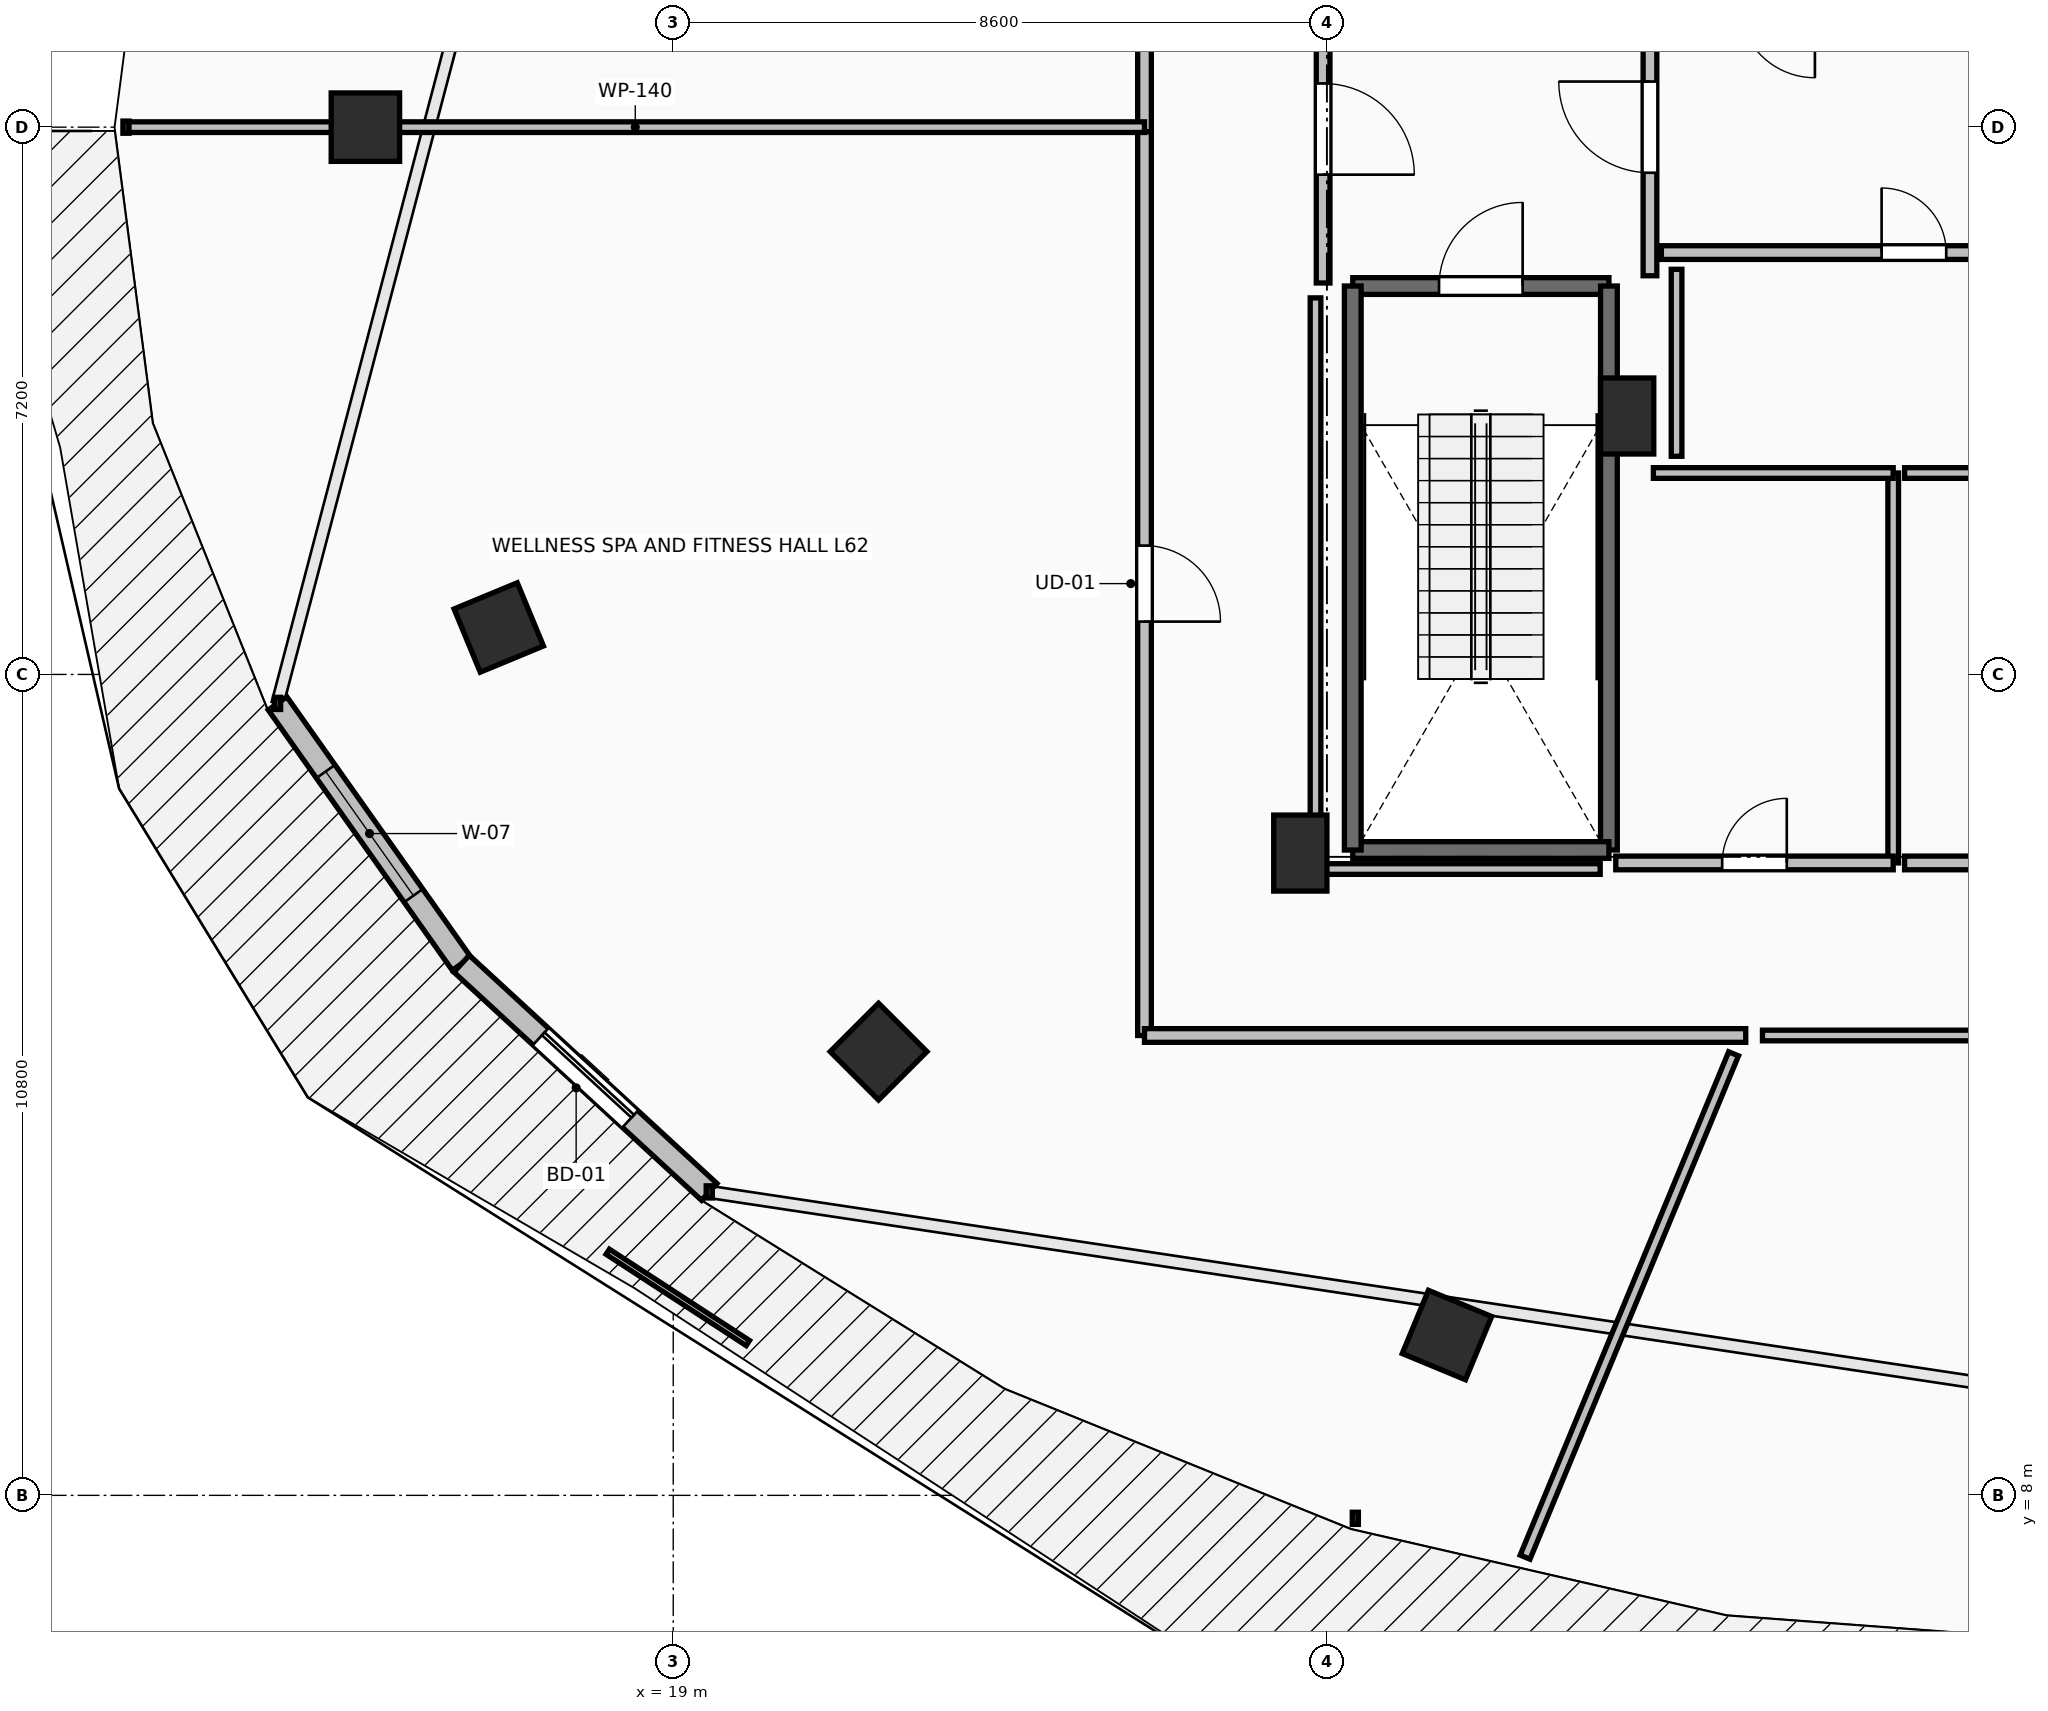
"""IFC4 building model, lengths in metres.
Left out: names, types, materials, properties, quantities, classifications, styles, units other than length and angle.
Written with IfcOpenShell. Run it as: python <this file> out.ifc"""

import sys

from ifc_helpers import new_model, si_unit, direction, frame, frame_2d, origin, origin_2d, place, context, subcontext, project, spatial, rectangle, extrude, element, fill, save


model = new_model("IFC4")
c1 = context("Model", 3, precision=1e-05, world=origin(), true_north=direction((0.0, 1.0)))
c2 = subcontext(c1, "Body", "Model", "MODEL_VIEW")
j1 = project(units=[si_unit("LENGTHUNIT", "METRE"), si_unit("PLANEANGLEUNIT", "RADIAN")], contexts=[c1])
p1 = place(None, origin())
s1 = spatial("IfcSite", under=j1, at=p1, CompositionType="ELEMENT")
p2 = place(p1, origin())
s2 = spatial("IfcBuilding", under=s1, at=p2, CompositionType="ELEMENT")
p3 = place(p2, frame((0.0, 0.0, 229.75)))
s3 = spatial("IfcBuildingStorey", under=s2, at=p3, CompositionType="ELEMENT", Elevation=229.75)
for number, where, z_axis, x_axis in (
    (1, (14.95, 26.0, 0.0), (0.0, 0.0, 1.0), (-1.0, 0.0, 0.0)),
    (2, (16.705, 19.418, 0.0), (0.0, 0.0, 1.0), (-0.924, -0.383, 0.0)),
    (3, (21.701, 13.838, 0.0), (0.0, 0.0, 1.0), (-0.707, -0.707, 0.0)),
    (4, (29.179, 10.109, 0.0), (0.0, 0.0, 1.0), (-0.383, -0.924, 0.0)),
):
    element("IfcColumn", number, at=place(p3, frame(where, z_axis=z_axis, x_axis=x_axis)), inside=s3, PredefinedType="COLUMN", context=c2, shape_type="SweptSolid", body=[
        extrude(rectangle(XDim=0.9, YDim=0.9, at=origin_2d()), origin(), (0.0, 0.0, 1.0), 4.5),
    ])
for number, where, z_axis, x_axis in (
    (5, (27.25, 16.45, 0.0), (0.0, 0.0, 1.0), (1.0, 0.0, 0.0)),
    (6, (31.55, 22.2, 0.0), (0.0, 0.0, 1.0), (1.0, 0.0, 0.0)),
):
    element("IfcColumn", number, at=place(p3, frame(where, z_axis=z_axis, x_axis=x_axis)), inside=s3, PredefinedType="PILASTER", context=c2, shape_type="SweptSolid", body=[
        extrude(rectangle(XDim=0.7, YDim=1.0, at=origin_2d()), origin(), (0.0, 0.0, 1.0), 4.5),
    ])
p4 = place(p3, frame((13.794, 18.419, 0.0), z_axis=(0.0, 0.0, 1.0), x_axis=(0.577261247247, -0.816559521668, 0.0)))
e7 = element("IfcWall", 7, at=p4, inside=s3, PredefinedType="STANDARD", context=c2, shape_type="SweptSolid", body=[
    extrude(rectangle(XDim=4.194, YDim=0.3, at=frame_2d((2.097, 0.0))), origin(), (0.0, 0.0, 1.0), 4.24),
])
p5 = place(p4, frame((1.097, 0.0, 0.85)))
e8 = element("IfcOpeningElement", 8, at=p5, cuts=e7, PredefinedType="OPENING", context=c2, shape_type="SweptSolid", body=[
    extrude(rectangle(XDim=2.0, YDim=2.45, at=frame_2d((1.0, 1.225))), frame((0.0, 0.165, 0.0), z_axis=(0.0, -1.0, 0.0), x_axis=(1.0, 0.0, 0.0)), (0.0, 0.0, 1.0), 0.33),
])
p6 = place(p3, frame((16.216, 14.994, 0.0), z_axis=(0.0, 0.0, 1.0), x_axis=(0.735445373611, -0.677584018727, 0.0)))
e9 = element("IfcWall", 9, at=p6, inside=s3, PredefinedType="STANDARD", context=c2, shape_type="SweptSolid", body=[
    extrude(rectangle(XDim=4.43, YDim=0.3, at=frame_2d((2.215, 0.0))), origin(), (0.0, 0.0, 1.0), 4.24),
])
p7 = place(p6, frame((1.415, 0.0, 0.0)))
e10 = element("IfcOpeningElement", 10, at=p7, cuts=e9, PredefinedType="OPENING", context=c2, shape_type="SweptSolid", body=[
    extrude(rectangle(XDim=1.6, YDim=2.3, at=frame_2d((0.8, 1.15))), frame((0.0, 0.165, 0.0), z_axis=(0.0, -1.0, 0.0), x_axis=(1.0, 0.0, 0.0)), (0.0, 0.0, 1.0), 0.33),
])
p8 = place(p3, frame((27.94, 23.91, 0.0), z_axis=(0.0, 0.0, 1.0), x_axis=(1.0, 0.0, 0.0)))
e11 = element("IfcWall", 11, at=p8, inside=s3, PredefinedType="SOLIDWALL", context=c2, shape_type="SweptSolid", body=[
    extrude(rectangle(XDim=3.37, YDim=0.22, at=frame_2d((1.685, 0.0))), origin(), (0.0, 0.0, 1.0), 4.24),
])
p9 = place(p8, frame((1.135, 0.0, 0.0)))
e12 = element("IfcOpeningElement", 12, at=p9, cuts=e11, PredefinedType="OPENING", context=c2, shape_type="SweptSolid", body=[
    extrude(rectangle(XDim=1.1, YDim=2.15, at=frame_2d((0.55, 1.075))), frame((0.0, 0.125, 0.0), z_axis=(0.0, -1.0, 0.0), x_axis=(1.0, 0.0, 0.0)), (0.0, 0.0, 1.0), 0.25),
])
p10 = place(p3, frame((31.31, 23.91, 0.0), z_axis=(0.0, 0.0, 1.0), x_axis=(0.0, -1.0, 0.0)))
e13 = element("IfcWall", 13, at=p10, inside=s3, PredefinedType="SOLIDWALL", context=c2, shape_type="SweptSolid", body=[
    extrude(rectangle(XDim=7.42, YDim=0.22, at=frame_2d((3.71, 0.0))), origin(), (0.0, 0.0, 1.0), 4.24),
])
p11 = place(p3, frame((31.31, 16.49, 0.0), z_axis=(0.0, 0.0, 1.0), x_axis=(-1.0, 0.0, 0.0)))
e14 = element("IfcWall", 14, at=p11, inside=s3, PredefinedType="SOLIDWALL", context=c2, shape_type="SweptSolid", body=[
    extrude(rectangle(XDim=3.37, YDim=0.22, at=frame_2d((1.685, 0.0))), origin(), (0.0, 0.0, 1.0), 4.24),
])
p12 = place(p3, frame((27.94, 16.49, 0.0), z_axis=(0.0, 0.0, 1.0), x_axis=(0.0, 1.0, 0.0)))
e15 = element("IfcWall", 15, at=p12, inside=s3, PredefinedType="SOLIDWALL", context=c2, shape_type="SweptSolid", body=[
    extrude(rectangle(XDim=7.42, YDim=0.22, at=frame_2d((3.71, 0.0))), origin(), (0.0, 0.0, 1.0), 4.24),
])
p13 = place(p3, frame((31.85, 24.045, 0.0), z_axis=(0.0, 0.0, 1.0), x_axis=(0.0, 1.0, 0.0)))
e16 = element("IfcWall", 16, at=p13, inside=s3, PredefinedType="PARTITIONING", context=c2, shape_type="SweptSolid", body=[
    extrude(rectangle(XDim=3.91, YDim=0.18, at=frame_2d((1.955, 0.0))), origin(), (0.0, 0.0, 1.0), 4.24),
])
p14 = place(p13, frame((1.355, 0.0, 0.0)))
e17 = element("IfcOpeningElement", 17, at=p14, cuts=e16, PredefinedType="OPENING", context=c2, shape_type="SweptSolid", body=[
    extrude(rectangle(XDim=1.2, YDim=2.15, at=frame_2d((0.6, 1.075))), frame((0.0, 0.105, 0.0), z_axis=(0.0, -1.0, 0.0), x_axis=(1.0, 0.0, 0.0)), (0.0, 0.0, 1.0), 0.21),
])
p15 = place(p3, frame((27.55, 28.0, 0.0), z_axis=(0.0, 0.0, 1.0), x_axis=(0.0, -1.0, 0.0)))
e18 = element("IfcWall", 18, at=p15, inside=s3, PredefinedType="PARTITIONING", context=c2, shape_type="SweptSolid", body=[
    extrude(rectangle(XDim=4.05, YDim=0.18, at=frame_2d((2.025, 0.0))), origin(), (0.0, 0.0, 1.0), 4.24),
])
p16 = place(p15, frame((1.425, 0.0, 0.0)))
e19 = element("IfcOpeningElement", 19, at=p16, cuts=e18, PredefinedType="OPENING", context=c2, shape_type="SweptSolid", body=[
    extrude(rectangle(XDim=1.2, YDim=2.15, at=frame_2d((0.6, 1.075))), frame((0.0, 0.105, 0.0), z_axis=(0.0, -1.0, 0.0), x_axis=(1.0, 0.0, 0.0)), (0.0, 0.0, 1.0), 0.21),
])
p17 = place(p3, frame((32.0, 24.35, 0.0), z_axis=(0.0, 0.0, 1.0), x_axis=(1.0, 0.0, 0.0)))
e20 = element("IfcWall", 20, at=p17, inside=s3, PredefinedType="PARTITIONING", context=c2, shape_type="SweptSolid", body=[
    extrude(rectangle(XDim=6.645, YDim=0.18, at=frame_2d((3.323, 0.0))), origin(), (0.0, 0.0, 1.0), 4.24),
])
p18 = place(p17, frame((2.897, 0.0, 0.0)))
e21 = element("IfcOpeningElement", 21, at=p18, cuts=e20, PredefinedType="OPENING", context=c2, shape_type="SweptSolid", body=[
    extrude(rectangle(XDim=0.85, YDim=2.1, at=frame_2d((0.425, 1.05))), frame((0.0, 0.105, 0.0), z_axis=(0.0, -1.0, 0.0), x_axis=(1.0, 0.0, 0.0)), (0.0, 0.0, 1.0), 0.21),
])
p19 = place(p3, frame((35.05, 16.32, 0.0), z_axis=(0.0, 0.0, 1.0), x_axis=(0.0, 1.0, 0.0)))
e22 = element("IfcWall", 22, at=p19, inside=s3, PredefinedType="PARTITIONING", context=c2, shape_type="SweptSolid", body=[
    extrude(rectangle(XDim=5.13, YDim=0.14, at=frame_2d((2.565, 0.0))), origin(), (0.0, 0.0, 1.0), 4.24),
])
p20 = place(p3, frame((35.05, 21.45, 0.0), z_axis=(0.0, 0.0, 1.0), x_axis=(-1.0, 0.0, 0.0)))
e23 = element("IfcWall", 23, at=p20, inside=s3, PredefinedType="PARTITIONING", context=c2, shape_type="SweptSolid", body=[
    extrude(rectangle(XDim=3.155, YDim=0.14, at=frame_2d((1.578, 0.0))), origin(), (0.0, 0.0, 1.0), 4.24),
])
p21 = place(p3, frame((31.4, 16.32, 0.0), z_axis=(0.0, 0.0, 1.0), x_axis=(1.0, 0.0, 0.0)))
e24 = element("IfcWall", 24, at=p21, inside=s3, PredefinedType="PARTITIONING", context=c2, shape_type="SweptSolid", body=[
    extrude(rectangle(XDim=3.65, YDim=0.18, at=frame_2d((1.825, 0.0))), origin(), (0.0, 0.0, 1.0), 4.24),
])
p22 = place(p21, frame((1.4, 0.0, 0.0)))
e25 = element("IfcOpeningElement", 25, at=p22, cuts=e24, PredefinedType="OPENING", context=c2, shape_type="SweptSolid", body=[
    extrude(rectangle(XDim=0.85, YDim=2.1, at=frame_2d((0.425, 1.05))), frame((0.0, 0.105, 0.0), z_axis=(0.0, -1.0, 0.0), x_axis=(1.0, 0.0, 0.0)), (0.0, 0.0, 1.0), 0.21),
])
p23 = place(p3, frame((38.8, 21.45, 0.0), z_axis=(0.0, 0.0, 1.0), x_axis=(-1.0, 0.0, 0.0)))
e26 = element("IfcWall", 26, at=p23, inside=s3, PredefinedType="PARTITIONING", context=c2, shape_type="SweptSolid", body=[
    extrude(rectangle(XDim=3.6, YDim=0.14, at=frame_2d((1.8, 0.0))), origin(), (0.0, 0.0, 1.0), 4.24),
])
p24 = place(p3, frame((35.2, 16.32, 0.0), z_axis=(0.0, 0.0, 1.0), x_axis=(1.0, 0.0, 0.0)))
e27 = element("IfcWall", 27, at=p24, inside=s3, PredefinedType="PARTITIONING", context=c2, shape_type="SweptSolid", body=[
    extrude(rectangle(XDim=3.6, YDim=0.18, at=frame_2d((1.8, 0.0))), origin(), (0.0, 0.0, 1.0), 4.24),
])
p25 = place(p24, frame((1.375, 0.0, 0.0)))
e28 = element("IfcOpeningElement", 28, at=p25, cuts=e27, PredefinedType="OPENING", context=c2, shape_type="SweptSolid", body=[
    extrude(rectangle(XDim=0.85, YDim=2.1, at=frame_2d((0.425, 1.05))), frame((0.0, 0.105, 0.0), z_axis=(0.0, -1.0, 0.0), x_axis=(1.0, 0.0, 0.0)), (0.0, 0.0, 1.0), 0.21),
])
p26 = place(p3, frame((25.2, 35.95, 0.0), z_axis=(0.0, 0.0, 1.0), x_axis=(0.0, -1.0, 0.0)))
e29 = element("IfcWall", 29, at=p26, inside=s3, PredefinedType="PARTITIONING", context=c2, shape_type="SweptSolid", body=[
    extrude(rectangle(XDim=10.01, YDim=0.18, at=frame_2d((5.005, 0.0))), origin(), (0.0, 0.0, 1.0), 3.432),
])
p27 = place(p26, frame((4.505, 0.0, 0.0)))
e30 = element("IfcOpeningElement", 30, at=p27, cuts=e29, PredefinedType="OPENING", context=c2, shape_type="SweptSolid", body=[
    extrude(rectangle(XDim=1.0, YDim=2.15, at=frame_2d((0.5, 1.075))), frame((0.0, 0.105, 0.0), z_axis=(0.0, -1.0, 0.0), x_axis=(1.0, 0.0, 0.0)), (0.0, 0.0, 1.0), 0.21),
])
p28 = place(p3, frame((25.2, 25.94, 0.0), z_axis=(0.0, 0.0, 1.0), x_axis=(0.0, -1.0, 0.0)))
e31 = element("IfcWall", 31, at=p28, inside=s3, PredefinedType="PARTITIONING", context=c2, shape_type="SweptSolid", body=[
    extrude(rectangle(XDim=11.89, YDim=0.18, at=frame_2d((5.945, 0.0))), origin(), (0.0, 0.0, 1.0), 3.432),
])
p29 = place(p28, frame((5.445, 0.0, 0.0)))
e32 = element("IfcOpeningElement", 32, at=p29, cuts=e31, PredefinedType="OPENING", context=c2, shape_type="SweptSolid", body=[
    extrude(rectangle(XDim=1.0, YDim=2.15, at=frame_2d((0.5, 1.075))), frame((0.0, 0.105, 0.0), z_axis=(0.0, -1.0, 0.0), x_axis=(1.0, 0.0, 0.0)), (0.0, 0.0, 1.0), 0.21),
])
p30 = place(p3, frame((25.2, 14.05, 0.0), z_axis=(0.0, 0.0, 1.0), x_axis=(1.0, 0.0, 0.0)))
e33 = element("IfcWall", 33, at=p30, inside=s3, PredefinedType="PARTITIONING", context=c2, shape_type="SweptSolid", body=[
    extrude(rectangle(XDim=7.91, YDim=0.18, at=frame_2d((3.955, 0.0))), origin(), (0.0, 0.0, 1.0), 3.432),
])
p31 = place(p3, frame((11.801, 26.0, 0.0), z_axis=(0.0, 0.0, 1.0), x_axis=(1.0, 0.0, 0.0)))
e34 = element("IfcWall", 34, at=p31, inside=s3, PredefinedType="PARTITIONING", context=c2, shape_type="SweptSolid", body=[
    extrude(rectangle(XDim=13.399, YDim=0.14, at=frame_2d((6.699, 0.0))), origin(), (0.0, 0.0, 1.0), 3.432),
])
p32 = place(p3, frame((32.2, 24.13, 0.0), z_axis=(0.0, 0.0, 1.0), x_axis=(0.0, -1.0, 0.0)))
e35 = element("IfcWall", 35, at=p32, inside=s3, PredefinedType="PARTITIONING", context=c2, shape_type="SweptSolid", body=[
    extrude(rectangle(XDim=2.46, YDim=0.14, at=frame_2d((1.23, 0.0))), origin(), (0.0, 0.0, 1.0), 3.432),
])
p33 = place(p3, frame((33.33, 14.05, 0.0), z_axis=(0.0, 0.0, 1.0), x_axis=(1.0, 0.0, 0.0)))
e36 = element("IfcWall", 36, at=p33, inside=s3, PredefinedType="PARTITIONING", context=c2, shape_type="SweptSolid", body=[
    extrude(rectangle(XDim=3.22, YDim=0.14, at=frame_2d((1.61, 0.0))), origin(), (0.0, 0.0, 1.0), 3.929),
])
p34 = place(p3, frame((27.45, 23.754, 0.0), z_axis=(0.0, 0.0, 1.0), x_axis=(0.0, -1.0, 0.0)))
e37 = element("IfcWall", 37, at=p34, inside=s3, PredefinedType="PARTITIONING", context=c2, shape_type="SweptSolid", body=[
    extrude(rectangle(XDim=7.514, YDim=0.14, at=frame_2d((3.757, 0.0))), origin(), (0.0, 0.0, 1.0), 3.432),
])
p35 = place(p3, frame((27.45, 16.24, 0.0), z_axis=(0.0, 0.0, 1.0), x_axis=(1.0, 0.0, 0.0)))
e38 = element("IfcWall", 38, at=p35, inside=s3, PredefinedType="PARTITIONING", context=c2, shape_type="SweptSolid", body=[
    extrude(rectangle(XDim=3.745, YDim=0.14, at=frame_2d((1.873, 0.0))), origin(), (0.0, 0.0, 1.0), 3.432),
])
p36 = place(p3, frame((30.207, 7.187, 0.0), z_axis=(0.0, 0.0, 1.0), x_axis=(0.382679691634, 0.923881081964, 0.0)))
e39 = element("IfcWall", 39, at=p36, inside=s3, PredefinedType="PARTITIONING", context=c2, shape_type="SweptSolid", body=[
    extrude(rectangle(XDim=7.168, YDim=0.14, at=frame_2d((3.584, 0.0))), origin(), (0.0, 0.0, 1.0), 3.774),
])
p37 = place(p7, origin())
e40 = element("IfcDoor", 40, at=p37, inside=s3, OperationType="SLIDING_TO_LEFT", PredefinedType="DOOR", context=c2, shape_type="SweptSolid", body=[
    extrude(rectangle(XDim=1.6, YDim=2.3, at=frame_2d((0.8, 1.15))), frame((0.0, 0.025, 0.0), z_axis=(0.0, -1.0, 0.0), x_axis=(1.0, 0.0, 0.0)), (0.0, 0.0, 1.0), 0.05),
])
fill(e10, e40)
p38 = place(p5, origin())
e41 = element("IfcWindow", 41, at=p38, inside=s3, PartitioningType="SINGLE_PANEL", PredefinedType="WINDOW", context=c2, shape_type="SweptSolid", body=[
    extrude(rectangle(XDim=2.0, YDim=2.45, at=frame_2d((1.0, 1.225))), frame((0.0, 0.03, 0.0), z_axis=(0.0, -1.0, 0.0), x_axis=(1.0, 0.0, 0.0)), (0.0, 0.0, 1.0), 0.06),
])
fill(e8, e41)
p39 = place(p9, origin())
e42 = element("IfcDoor", 42, at=p39, inside=s3, OperationType="SINGLE_SWING_RIGHT", PredefinedType="DOOR", context=c2, shape_type="SweptSolid", body=[
    extrude(rectangle(XDim=1.1, YDim=2.15, at=frame_2d((0.55, 1.075))), frame((0.0, 0.025, 0.0), z_axis=(0.0, -1.0, 0.0), x_axis=(1.0, 0.0, 0.0)), (0.0, 0.0, 1.0), 0.05),
])
fill(e12, e42)
p40 = place(p14, origin())
e43 = element("IfcDoor", 43, at=p40, inside=s3, OperationType="SINGLE_SWING_RIGHT", PredefinedType="DOOR", context=c2, shape_type="SweptSolid", body=[
    extrude(rectangle(XDim=1.2, YDim=2.15, at=frame_2d((0.6, 1.075))), frame((0.0, 0.025, 0.0), z_axis=(0.0, -1.0, 0.0), x_axis=(1.0, 0.0, 0.0)), (0.0, 0.0, 1.0), 0.05),
])
fill(e17, e43)
p41 = place(p16, origin())
e44 = element("IfcDoor", 44, at=p41, inside=s3, OperationType="SINGLE_SWING_RIGHT", PredefinedType="DOOR", context=c2, shape_type="SweptSolid", body=[
    extrude(rectangle(XDim=1.2, YDim=2.15, at=frame_2d((0.6, 1.075))), frame((0.0, 0.025, 0.0), z_axis=(0.0, -1.0, 0.0), x_axis=(1.0, 0.0, 0.0)), (0.0, 0.0, 1.0), 0.05),
])
fill(e19, e44)
p42 = place(p18, origin())
e45 = element("IfcDoor", 45, at=p42, inside=s3, OperationType="SINGLE_SWING_LEFT", PredefinedType="DOOR", context=c2, shape_type="SweptSolid", body=[
    extrude(rectangle(XDim=0.85, YDim=2.1, at=frame_2d((0.425, 1.05))), frame((0.0, 0.025, 0.0), z_axis=(0.0, -1.0, 0.0), x_axis=(1.0, 0.0, 0.0)), (0.0, 0.0, 1.0), 0.05),
])
fill(e21, e45)
p43 = place(p22, origin())
e46 = element("IfcDoor", 46, at=p43, inside=s3, OperationType="SINGLE_SWING_RIGHT", PredefinedType="DOOR", context=c2, shape_type="SweptSolid", body=[
    extrude(rectangle(XDim=0.85, YDim=2.1, at=frame_2d((0.425, 1.05))), frame((0.0, 0.025, 0.0), z_axis=(0.0, -1.0, 0.0), x_axis=(1.0, 0.0, 0.0)), (0.0, 0.0, 1.0), 0.05),
])
fill(e25, e46)
p44 = place(p29, origin())
e47 = element("IfcDoor", 47, at=p44, inside=s3, OperationType="SINGLE_SWING_RIGHT", PredefinedType="DOOR", context=c2, shape_type="SweptSolid", body=[
    extrude(rectangle(XDim=1.0, YDim=2.15, at=frame_2d((0.5, 1.075))), frame((0.0, 0.025, 0.0), z_axis=(0.0, -1.0, 0.0), x_axis=(1.0, 0.0, 0.0)), (0.0, 0.0, 1.0), 0.05),
])
fill(e32, e47)
save(model, sys.argv[1])
